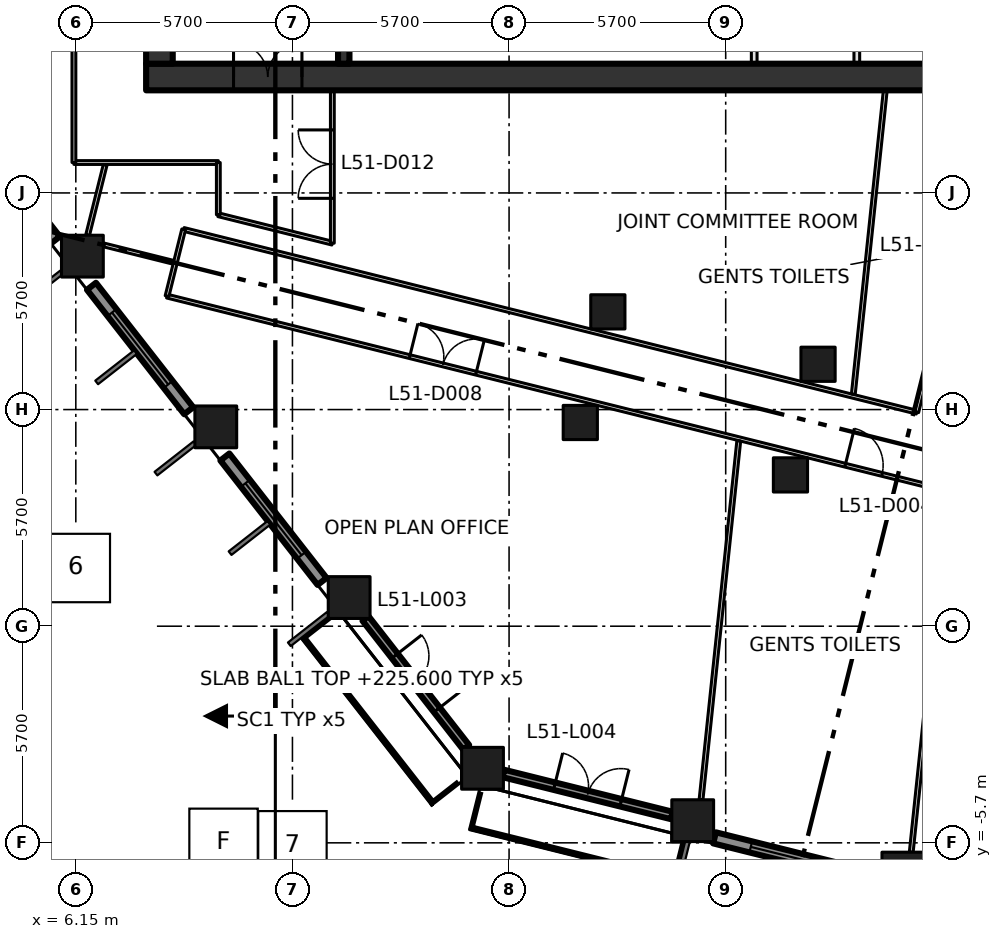
"""IFC4 building model, lengths in metres.
Left out: names, types, materials, properties, quantities, classifications, styles, units other than length and angle.
Written with IfcOpenShell. Run it as: python <this file> out.ifc"""

import sys

from ifc_helpers import new_model, si_unit, direction, frame, frame_2d, origin, origin_2d, place, context, subcontext, project, spatial, rectangle, extrude, element, fill, save


model = new_model("IFC4")
c1 = context("Model", 3, precision=1e-05, world=origin(), true_north=direction((0.0, 1.0)))
c2 = subcontext(c1, "Body", "Model", "MODEL_VIEW")
j1 = project(units=[si_unit("LENGTHUNIT", "METRE"), si_unit("PLANEANGLEUNIT", "RADIAN")], contexts=[c1])
p1 = place(None, origin())
s1 = spatial("IfcSite", under=j1, at=p1, CompositionType="ELEMENT")
p2 = place(p1, origin())
s2 = spatial("IfcBuilding", under=s1, at=p2, CompositionType="ELEMENT")
p3 = place(p2, frame((0.0, 0.0, 225.6)))
s3 = spatial("IfcBuildingStorey", under=s2, at=p3, CompositionType="ELEMENT", Elevation=225.6)
for number, where, z_axis, x_axis in (
    (1, (16.851, -3.738, 0.0), (0.0, 0.0, 1.0), (1.0, 0.0, 0.0)),
    (2, (13.342, 0.754, 0.0), (0.0, 0.0, 1.0), (1.0, 0.0, 0.0)),
    (3, (9.833, 5.245, 0.0), (0.0, 0.0, 1.0), (1.0, 0.0, 0.0)),
    (4, (6.323, 9.737, 0.0), (0.0, 0.0, 1.0), (1.0, 0.0, 0.0)),
    (5, (22.382, -5.117, 0.0), (0.0, 0.0, 1.0), (1.0, 0.0, 0.0)),
    (6, (27.912, -6.496, 0.0), (0.0, 0.0, 1.0), (1.0, 0.0, 0.0)),
):
    element("IfcColumn", number, at=place(p3, frame(where, z_axis=z_axis, x_axis=x_axis)), inside=s3, PredefinedType="COLUMN", context=c2, shape_type="SweptSolid", body=[
        extrude(rectangle(XDim=1.1, YDim=1.1, at=origin_2d()), origin(), (0.0, 0.0, 1.0), 4.2),
    ])
for number, where, z_axis, x_axis in (
    (7, (19.424, 5.36, 0.0), (0.0, 0.0, 1.0), (1.0, 0.0, 0.0)),
    (8, (24.954, 3.981, 0.0), (0.0, 0.0, 1.0), (1.0, 0.0, 0.0)),
    (9, (20.149, 8.271, 0.0), (0.0, 0.0, 1.0), (1.0, 0.0, 0.0)),
    (10, (25.68, 6.892, 0.0), (0.0, 0.0, 1.0), (1.0, 0.0, 0.0)),
):
    element("IfcColumn", number, at=place(p3, frame(where, z_axis=z_axis, x_axis=x_axis)), inside=s3, PredefinedType="COLUMN", context=c2, shape_type="SweptSolid", body=[
        extrude(rectangle(XDim=0.9, YDim=0.9, at=origin_2d()), origin(), (0.0, 0.0, 1.0), 4.2),
    ])
p4 = place(p3, frame((8.0, 14.45, -0.3), z_axis=(0.0, 0.0, 1.0), x_axis=(1.0, 0.0, 0.0)))
e11 = element("IfcWall", 11, at=p4, inside=s3, PredefinedType="SHEAR", context=c2, shape_type="SweptSolid", body=[
    extrude(rectangle(XDim=22.8, YDim=0.7, at=frame_2d((11.4, 0.0))), origin(), (0.0, 0.0, 1.0), 4.2),
])
p5 = place(p4, frame((2.3, 0.0, 0.3)))
e12 = element("IfcOpeningElement", 12, at=p5, cuts=e11, PredefinedType="OPENING", context=c2, shape_type="SweptSolid", body=[
    extrude(rectangle(XDim=1.8, YDim=2.1, at=frame_2d((0.9, 1.05))), frame((0.0, 0.36, 0.0), z_axis=(0.0, -1.0, 0.0), x_axis=(1.0, 0.0, 0.0)), (0.0, 0.0, 1.0), 0.72),
])
p6 = place(p3, frame((8.35, 14.8, -0.3), z_axis=(0.0, 0.0, 1.0), x_axis=(0.0, 1.0, 0.0)))
e13 = element("IfcWall", 13, at=p6, inside=s3, PredefinedType="SHEAR", context=c2, shape_type="SweptSolid", body=[
    extrude(rectangle(XDim=20.9, YDim=0.7, at=frame_2d((10.45, 0.0))), origin(), (0.0, 0.0, 1.0), 4.2),
])
p7 = place(p3, frame((13.2, 14.8, 0.0), z_axis=(0.0, 0.0, 1.0), x_axis=(0.0, 1.0, 0.0)))
e14 = element("IfcWall", 14, at=p7, inside=s3, PredefinedType="SHEAR", context=c2, shape_type="SweptSolid", body=[
    extrude(rectangle(XDim=20.9, YDim=0.3, at=frame_2d((10.45, 0.0))), origin(), (0.0, 0.0, 1.0), 3.9),
])
p8 = place(p7, frame((3.5, 0.0, 0.0)))
e15 = element("IfcOpeningElement", 15, at=p8, cuts=e14, PredefinedType="OPENING", context=c2, shape_type="SweptSolid", body=[
    extrude(rectangle(XDim=1.8, YDim=2.1, at=frame_2d((0.9, 1.05))), frame((0.0, 0.16, 0.0), z_axis=(0.0, -1.0, 0.0), x_axis=(1.0, 0.0, 0.0)), (0.0, 0.0, 1.0), 0.32),
])
p9 = place(p7, frame((11.6, 0.0, 0.0)))
e16 = element("IfcOpeningElement", 16, at=p9, cuts=e14, PredefinedType="OPENING", context=c2, shape_type="SweptSolid", body=[
    extrude(rectangle(XDim=1.2, YDim=2.1, at=frame_2d((0.6, 1.05))), frame((0.0, 0.16, 0.0), z_axis=(0.0, -1.0, 0.0), x_axis=(1.0, 0.0, 0.0)), (0.0, 0.0, 1.0), 0.32),
])
for number, where, z_axis, x_axis in (
    (17, (24.0, 14.8, 0.0), (0.0, 0.0, 1.0), (0.0, 1.0, 0.0)),
    (18, (26.7, 14.8, 0.0), (0.0, 0.0, 1.0), (0.0, 1.0, 0.0)),
):
    element("IfcWall", number, at=place(p3, frame(where, z_axis=z_axis, x_axis=x_axis)), inside=s3, PredefinedType="PARTITIONING", context=c2, shape_type="SweptSolid", body=[
        extrude(rectangle(XDim=2.825, YDim=0.15, at=frame_2d((1.413, 0.0))), origin(), (0.0, 0.0, 1.0), 3.9),
    ])
p10 = place(p3, frame((3.053, 13.436, 0.0), z_axis=(0.0, 0.0, 1.0), x_axis=(0.615699893917, -0.787980736205, 0.0)))
e19 = element("IfcWall", 19, at=p10, inside=s3, PredefinedType="SOLIDWALL", context=c2, shape_type="SweptSolid", body=[
    extrude(rectangle(XDim=4.156, YDim=0.3, at=frame_2d((2.078, 0.0))), origin(), (0.0, 0.0, 1.0), 3.15),
])
p11 = place(p10, frame((0.878, 0.0, 0.8)))
e20 = element("IfcOpeningElement", 20, at=p11, cuts=e19, PredefinedType="OPENING", context=c2, shape_type="SweptSolid", body=[
    extrude(rectangle(XDim=2.4, YDim=2.1, at=frame_2d((1.2, 1.05))), frame((0.0, 0.16, 0.0), z_axis=(0.0, -1.0, 0.0), x_axis=(1.0, 0.0, 0.0)), (0.0, 0.0, 1.0), 0.32),
])
p12 = place(p3, frame((6.562, 8.944, 0.0), z_axis=(0.0, 0.0, 1.0), x_axis=(0.615699893917, -0.787980736205, 0.0)))
e21 = element("IfcWall", 21, at=p12, inside=s3, PredefinedType="SOLIDWALL", context=c2, shape_type="SweptSolid", body=[
    extrude(rectangle(XDim=4.156, YDim=0.3, at=frame_2d((2.078, 0.0))), origin(), (0.0, 0.0, 1.0), 3.15),
])
p13 = place(p12, frame((0.878, 0.0, 0.8)))
e22 = element("IfcOpeningElement", 22, at=p13, cuts=e21, PredefinedType="OPENING", context=c2, shape_type="SweptSolid", body=[
    extrude(rectangle(XDim=2.4, YDim=2.1, at=frame_2d((1.2, 1.05))), frame((0.0, 0.16, 0.0), z_axis=(0.0, -1.0, 0.0), x_axis=(1.0, 0.0, 0.0)), (0.0, 0.0, 1.0), 0.32),
])
p14 = place(p3, frame((10.072, 4.452, 0.0), z_axis=(0.0, 0.0, 1.0), x_axis=(0.615660006568, -0.788011901124, 0.0)))
e23 = element("IfcWall", 23, at=p14, inside=s3, PredefinedType="SOLIDWALL", context=c2, shape_type="SweptSolid", body=[
    extrude(rectangle(XDim=4.155, YDim=0.3, at=frame_2d((2.077, 0.0))), origin(), (0.0, 0.0, 1.0), 3.15),
])
p15 = place(p14, frame((0.878, 0.0, 0.8)))
e24 = element("IfcOpeningElement", 24, at=p15, cuts=e23, PredefinedType="OPENING", context=c2, shape_type="SweptSolid", body=[
    extrude(rectangle(XDim=2.4, YDim=2.1, at=frame_2d((1.2, 1.05))), frame((0.0, 0.16, 0.0), z_axis=(0.0, -1.0, 0.0), x_axis=(1.0, 0.0, 0.0)), (0.0, 0.0, 1.0), 0.32),
])
p16 = place(p3, frame((13.772, 0.204, 0.0), z_axis=(0.0, 0.0, 1.0), x_axis=(0.615478906808, -0.788153357713, 0.0)))
e25 = element("IfcWall", 25, at=p16, inside=s3, PredefinedType="SOLIDWALL", context=c2, shape_type="SweptSolid", body=[
    extrude(rectangle(XDim=4.304, YDim=0.2, at=frame_2d((2.152, 0.0))), origin(), (0.0, 0.0, 1.0), 3.15),
])
p17 = place(p16, frame((1.252, 0.0, 0.0)))
e26 = element("IfcOpeningElement", 26, at=p17, cuts=e25, PredefinedType="OPENING", context=c2, shape_type="SweptSolid", body=[
    extrude(rectangle(XDim=1.8, YDim=2.9, at=frame_2d((0.9, 1.45))), frame((0.0, 0.11, 0.0), z_axis=(0.0, -1.0, 0.0), x_axis=(1.0, 0.0, 0.0)), (0.0, 0.0, 1.0), 0.22),
])
p18 = place(p3, frame((12.398, -0.199, 0.0), z_axis=(0.0, 0.0, 1.0), x_axis=(0.615638738903, -0.788028516719, 0.0)))
e27 = element("IfcWall", 27, at=p18, inside=s3, PredefinedType="SOLIDWALL", context=c2, shape_type="SweptSolid", body=[
    extrude(rectangle(XDim=5.36, YDim=0.4, at=frame_2d((2.68, 0.0))), origin(), (0.0, 0.0, 1.0), 0.3),
])
p19 = place(p3, frame((17.401, -3.875, 0.0), z_axis=(0.0, 0.0, 1.0), x_axis=(0.970286982272, -0.241956963183, 0.0)))
e28 = element("IfcWall", 28, at=p19, inside=s3, PredefinedType="SOLIDWALL", context=c2, shape_type="SweptSolid", body=[
    extrude(rectangle(XDim=4.567, YDim=0.2, at=frame_2d((2.283, 0.0))), origin(), (0.0, 0.0, 1.0), 3.15),
])
p20 = place(p19, frame((1.383, 0.0, 0.0)))
e29 = element("IfcOpeningElement", 29, at=p20, cuts=e28, PredefinedType="OPENING", context=c2, shape_type="SweptSolid", body=[
    extrude(rectangle(XDim=1.8, YDim=2.9, at=frame_2d((0.9, 1.45))), frame((0.0, 0.11, 0.0), z_axis=(0.0, -1.0, 0.0), x_axis=(1.0, 0.0, 0.0)), (0.0, 0.0, 1.0), 0.22),
])
p21 = place(p3, frame((16.694, -5.069, 0.0), z_axis=(0.0, 0.0, 1.0), x_axis=(0.970289679319, -0.241946147329, 0.0)))
e30 = element("IfcWall", 30, at=p21, inside=s3, PredefinedType="SOLIDWALL", context=c2, shape_type="SweptSolid", body=[
    extrude(rectangle(XDim=5.36, YDim=0.4, at=frame_2d((2.68, 0.0))), origin(), (0.0, 0.0, 1.0), 0.3),
])
p22 = place(p3, frame((22.956, -5.569, 0.0), z_axis=(0.0, 0.0, 1.0), x_axis=(0.970323116569, -0.241812012628, 0.0)))
e31 = element("IfcWall", 31, at=p22, inside=s3, PredefinedType="SOLIDWALL", context=c2, shape_type="SweptSolid", body=[
    extrude(rectangle(XDim=4.367, YDim=0.3, at=frame_2d((2.183, 0.0))), origin(), (0.0, 0.0, 1.0), 3.15),
])
p23 = place(p22, frame((0.983, 0.0, 0.8)))
e32 = element("IfcOpeningElement", 32, at=p23, cuts=e31, PredefinedType="OPENING", context=c2, shape_type="SweptSolid", body=[
    extrude(rectangle(XDim=2.4, YDim=2.1, at=frame_2d((1.2, 1.05))), frame((0.0, 0.16, 0.0), z_axis=(0.0, -1.0, 0.0), x_axis=(1.0, 0.0, 0.0)), (0.0, 0.0, 1.0), 0.32),
])
p24 = place(p3, frame((6.1, 12.2, 0.0), z_axis=(0.0, 0.0, 1.0), x_axis=(1.0, 0.0, 0.0)))
e33 = element("IfcWall", 33, at=p24, inside=s3, PredefinedType="PARTITIONING", context=c2, shape_type="SweptSolid", body=[
    extrude(rectangle(XDim=3.8, YDim=0.1, at=frame_2d((1.9, 0.0))), origin(), (0.0, 0.0, 1.0), 3.9),
])
p25 = place(p3, frame((6.1, 38.9, 0.0), z_axis=(0.0, 0.0, 1.0), x_axis=(0.0, -1.0, 0.0)))
e34 = element("IfcWall", 34, at=p25, inside=s3, PredefinedType="PARTITIONING", context=c2, shape_type="SweptSolid", body=[
    extrude(rectangle(XDim=26.7, YDim=0.1, at=frame_2d((13.35, 0.0))), origin(), (0.0, 0.0, 1.0), 3.9),
])
p26 = place(p25, frame((17.936, 0.0, 0.0)))
e35 = element("IfcOpeningElement", 35, at=p26, cuts=e34, PredefinedType="OPENING", context=c2, shape_type="SweptSolid", body=[
    extrude(rectangle(XDim=1.0, YDim=2.1, at=frame_2d((0.5, 1.05))), frame((0.0, 0.06, 0.0), z_axis=(0.0, -1.0, 0.0), x_axis=(1.0, 0.0, 0.0)), (0.0, 0.0, 1.0), 0.12),
])
p27 = place(p3, frame((8.55, 8.685, 0.0), z_axis=(0.0, 0.0, 1.0), x_axis=(0.970297101369, -0.241916380335, 0.0)))
e36 = element("IfcWall", 36, at=p27, inside=s3, PredefinedType="PARTITIONING", context=c2, shape_type="SweptSolid", body=[
    extrude(rectangle(XDim=51.675, YDim=0.1, at=frame_2d((25.837, 0.0))), origin(), (0.0, 0.0, 1.0), 3.9),
])
p28 = place(p27, frame((18.391, 0.0, 0.0)))
e37 = element("IfcOpeningElement", 37, at=p28, cuts=e36, PredefinedType="OPENING", context=c2, shape_type="SweptSolid", body=[
    extrude(rectangle(XDim=1.0, YDim=2.1, at=frame_2d((0.5, 1.05))), frame((0.0, 0.06, 0.0), z_axis=(0.0, -1.0, 0.0), x_axis=(1.0, 0.0, 0.0)), (0.0, 0.0, 1.0), 0.12),
])
p29 = place(p27, frame((24.69, 0.0, 0.0)))
e38 = element("IfcOpeningElement", 38, at=p29, cuts=e36, PredefinedType="OPENING", context=c2, shape_type="SweptSolid", body=[
    extrude(rectangle(XDim=1.0, YDim=2.1, at=frame_2d((0.5, 1.05))), frame((0.0, 0.06, 0.0), z_axis=(0.0, -1.0, 0.0), x_axis=(1.0, 0.0, 0.0)), (0.0, 0.0, 1.0), 0.12),
])
p30 = place(p27, frame((29.99, 0.0, 0.0)))
e39 = element("IfcOpeningElement", 39, at=p30, cuts=e36, PredefinedType="OPENING", context=c2, shape_type="SweptSolid", body=[
    extrude(rectangle(XDim=1.8, YDim=2.1, at=frame_2d((0.9, 1.05))), frame((0.0, 0.06, 0.0), z_axis=(0.0, -1.0, 0.0), x_axis=(1.0, 0.0, 0.0)), (0.0, 0.0, 1.0), 0.12),
])
p31 = place(p27, frame((6.58, 0.0, 0.0)))
e40 = element("IfcOpeningElement", 40, at=p31, cuts=e36, PredefinedType="OPENING", context=c2, shape_type="SweptSolid", body=[
    extrude(rectangle(XDim=1.8, YDim=2.1, at=frame_2d((0.9, 1.05))), frame((0.0, 0.06, 0.0), z_axis=(0.0, -1.0, 0.0), x_axis=(1.0, 0.0, 0.0)), (0.0, 0.0, 1.0), 0.12),
])
p32 = place(p3, frame((8.988, 10.44, 0.0), z_axis=(0.0, 0.0, 1.0), x_axis=(0.970301223092, -0.241899848006, 0.0)))
e41 = element("IfcWall", 41, at=p32, inside=s3, PredefinedType="PARTITIONING", context=c2, shape_type="SweptSolid", body=[
    extrude(rectangle(XDim=19.879, YDim=0.1, at=frame_2d((9.94, 0.0))), origin(), (0.0, 0.0, 1.0), 3.9),
])
p33 = place(p3, frame((8.988, 10.44, 0.0), z_axis=(0.0, 0.0, 1.0), x_axis=(-0.242154485745, -0.970237705428, 0.0)))
e42 = element("IfcWall", 42, at=p33, inside=s3, PredefinedType="PARTITIONING", context=c2, shape_type="SweptSolid", body=[
    extrude(rectangle(XDim=1.809, YDim=0.1, at=frame_2d((0.904, 0.0))), origin(), (0.0, 0.0, 1.0), 3.9),
])
p34 = place(p3, frame((9.9, 10.826, 0.0), z_axis=(0.0, 0.0, 1.0), x_axis=(0.970290953223, -0.241941038466, 0.0)))
e43 = element("IfcWall", 43, at=p34, inside=s3, PredefinedType="PARTITIONING", context=c2, shape_type="SweptSolid", body=[
    extrude(rectangle(XDim=3.092, YDim=0.1, at=frame_2d((1.546, 0.0))), origin(), (0.0, 0.0, 1.0), 3.9),
])
p35 = place(p3, frame((9.9, 12.2, 0.0), z_axis=(0.0, 0.0, 1.0), x_axis=(0.0, -1.0, 0.0)))
e44 = element("IfcWall", 44, at=p35, inside=s3, PredefinedType="PARTITIONING", context=c2, shape_type="SweptSolid", body=[
    extrude(rectangle(XDim=1.374, YDim=0.1, at=frame_2d((0.687, 0.0))), origin(), (0.0, 0.0, 1.0), 3.9),
])
p36 = place(p3, frame((12.9, 10.078, 0.0), z_axis=(0.0, 0.0, 1.0), x_axis=(0.0, 1.0, 0.0)))
e45 = element("IfcWall", 45, at=p36, inside=s3, PredefinedType="PARTITIONING", context=c2, shape_type="SweptSolid", body=[
    extrude(rectangle(XDim=4.022, YDim=0.1, at=frame_2d((2.011, 0.0))), origin(), (0.0, 0.0, 1.0), 3.9),
])
p37 = place(p36, frame((1.18, 0.0, 0.0)))
e46 = element("IfcOpeningElement", 46, at=p37, cuts=e45, PredefinedType="OPENING", context=c2, shape_type="SweptSolid", body=[
    extrude(rectangle(XDim=1.8, YDim=2.1, at=frame_2d((0.9, 1.05))), frame((0.0, 0.06, 0.0), z_axis=(0.0, -1.0, 0.0), x_axis=(1.0, 0.0, 0.0)), (0.0, 0.0, 1.0), 0.12),
])
p38 = place(p3, frame((30.259, 13.583, 0.0), z_axis=(0.0, 0.0, 1.0), x_axis=(-0.241841612879, -0.970315739479, 0.0)))
e47 = element("IfcWall", 47, at=p38, inside=s3, PredefinedType="PARTITIONING", context=c2, shape_type="SweptSolid", body=[
    extrude(rectangle(XDim=8.195, YDim=0.1, at=frame_2d((4.098, 0.0))), origin(), (0.0, 0.0, 1.0), 3.9),
])
p39 = place(p38, frame((3.38, 0.0, 0.0)))
e48 = element("IfcOpeningElement", 48, at=p39, cuts=e47, PredefinedType="OPENING", context=c2, shape_type="SweptSolid", body=[
    extrude(rectangle(XDim=1.0, YDim=2.1, at=frame_2d((0.5, 1.05))), frame((0.0, 0.06, 0.0), z_axis=(0.0, -1.0, 0.0), x_axis=(1.0, 0.0, 0.0)), (0.0, 0.0, 1.0), 0.12),
])
p40 = place(p3, frame((6.922, 12.138, 0.0), z_axis=(0.0, 0.0, 1.0), x_axis=(-0.242264600824, -0.970210215978, 0.0)))
e49 = element("IfcWall", 49, at=p40, inside=s3, PredefinedType="PARTITIONING", context=c2, shape_type="SweptSolid", body=[
    extrude(rectangle(XDim=1.908, YDim=0.1, at=frame_2d((0.954, 0.0))), origin(), (0.0, 0.0, 1.0), 3.9),
])
p41 = place(p3, frame((8.72, 9.574, 0.0), z_axis=(0.0, 0.0, 1.0), x_axis=(-0.970240497311, 0.242143299263, 0.0)))
e50 = element("IfcWall", 50, at=p41, inside=s3, PredefinedType="PARTITIONING", context=c2, shape_type="SweptSolid", body=[
    extrude(rectangle(XDim=1.904, YDim=0.1, at=frame_2d((0.952, 0.0))), origin(), (0.0, 0.0, 1.0), 3.9),
])
p42 = place(p3, frame((22.601, -4.567, 0.0), z_axis=(0.0, 0.0, 1.0), x_axis=(0.104573690763, 0.994517140727, 0.0)))
e51 = element("IfcWall", 51, at=p42, inside=s3, PredefinedType="PARTITIONING", context=c2, shape_type="SweptSolid", body=[
    extrude(rectangle(XDim=9.495, YDim=0.1, at=frame_2d((4.748, 0.0))), origin(), (0.0, 0.0, 1.0), 3.9),
])
p43 = place(p3, frame((26.608, 6.105, 0.0), z_axis=(0.0, 0.0, 1.0), x_axis=(0.104619970127, 0.994512273353, 0.0)))
e52 = element("IfcWall", 52, at=p43, inside=s3, PredefinedType="PARTITIONING", context=c2, shape_type="SweptSolid", body=[
    extrude(rectangle(XDim=8.039, YDim=0.1, at=frame_2d((4.02, 0.0))), origin(), (0.0, 0.0, 1.0), 3.9),
])
p44 = place(p3, frame((28.132, -5.946, 0.0), z_axis=(0.0, 0.0, 1.0), x_axis=(0.104469291407, 0.994528112802, 0.0)))
e53 = element("IfcWall", 53, at=p44, inside=s3, PredefinedType="PARTITIONING", context=c2, shape_type="SweptSolid", body=[
    extrude(rectangle(XDim=9.495, YDim=0.1, at=frame_2d((4.748, 0.0))), origin(), (0.0, 0.0, 1.0), 3.9),
])
p45 = place(p5, origin())
e54 = element("IfcDoor", 54, at=p45, inside=s3, OperationType="DOUBLE_DOOR_SINGLE_SWING", PredefinedType="DOOR", context=c2, shape_type="SweptSolid", body=[
    extrude(rectangle(XDim=1.8, YDim=2.1, at=frame_2d((0.9, 1.05))), frame((0.0, 0.025, 0.0), z_axis=(0.0, -1.0, 0.0), x_axis=(1.0, 0.0, 0.0)), (0.0, 0.0, 1.0), 0.05),
])
fill(e12, e54)
p46 = place(p13, origin())
e55 = element("IfcWindow", 55, at=p46, inside=s3, PartitioningType="DOUBLE_PANEL_VERTICAL", PredefinedType="WINDOW", context=c2, shape_type="SweptSolid", body=[
    extrude(rectangle(XDim=2.4, YDim=2.1, at=frame_2d((1.2, 1.05))), frame((0.0, 0.03, 0.0), z_axis=(0.0, -1.0, 0.0), x_axis=(1.0, 0.0, 0.0)), (0.0, 0.0, 1.0), 0.06),
])
fill(e22, e55)
p47 = place(p15, origin())
e56 = element("IfcWindow", 56, at=p47, inside=s3, PartitioningType="DOUBLE_PANEL_VERTICAL", PredefinedType="WINDOW", context=c2, shape_type="SweptSolid", body=[
    extrude(rectangle(XDim=2.4, YDim=2.1, at=frame_2d((1.2, 1.05))), frame((0.0, 0.03, 0.0), z_axis=(0.0, -1.0, 0.0), x_axis=(1.0, 0.0, 0.0)), (0.0, 0.0, 1.0), 0.06),
])
fill(e24, e56)
p48 = place(p17, origin())
e57 = element("IfcDoor", 57, at=p48, inside=s3, OperationType="DOUBLE_DOOR_SINGLE_SWING", PredefinedType="DOOR", context=c2, shape_type="SweptSolid", body=[
    extrude(rectangle(XDim=1.8, YDim=2.9, at=frame_2d((0.9, 1.45))), frame((0.0, 0.025, 0.0), z_axis=(0.0, -1.0, 0.0), x_axis=(1.0, 0.0, 0.0)), (0.0, 0.0, 1.0), 0.05),
])
fill(e26, e57)
p49 = place(p20, origin())
e58 = element("IfcDoor", 58, at=p49, inside=s3, OperationType="DOUBLE_DOOR_SINGLE_SWING", PredefinedType="DOOR", context=c2, shape_type="SweptSolid", body=[
    extrude(rectangle(XDim=1.8, YDim=2.9, at=frame_2d((0.9, 1.45))), frame((0.0, 0.025, 0.0), z_axis=(0.0, -1.0, 0.0), x_axis=(1.0, 0.0, 0.0)), (0.0, 0.0, 1.0), 0.05),
])
fill(e29, e58)
p50 = place(p23, origin())
e59 = element("IfcWindow", 59, at=p50, inside=s3, PartitioningType="DOUBLE_PANEL_VERTICAL", PredefinedType="WINDOW", context=c2, shape_type="SweptSolid", body=[
    extrude(rectangle(XDim=2.4, YDim=2.1, at=frame_2d((1.2, 1.05))), frame((0.0, 0.03, 0.0), z_axis=(0.0, -1.0, 0.0), x_axis=(1.0, 0.0, 0.0)), (0.0, 0.0, 1.0), 0.06),
])
fill(e32, e59)
p51 = place(p28, origin())
e60 = element("IfcDoor", 60, at=p51, inside=s3, OperationType="SINGLE_SWING_LEFT", PredefinedType="DOOR", context=c2, shape_type="SweptSolid", body=[
    extrude(rectangle(XDim=1.0, YDim=2.1, at=frame_2d((0.5, 1.05))), frame((0.0, 0.025, 0.0), z_axis=(0.0, -1.0, 0.0), x_axis=(1.0, 0.0, 0.0)), (0.0, 0.0, 1.0), 0.05),
])
fill(e37, e60)
p52 = place(p31, origin())
e61 = element("IfcDoor", 61, at=p52, inside=s3, OperationType="DOUBLE_DOOR_SINGLE_SWING", PredefinedType="DOOR", context=c2, shape_type="SweptSolid", body=[
    extrude(rectangle(XDim=1.8, YDim=2.1, at=frame_2d((0.9, 1.05))), frame((0.0, 0.025, 0.0), z_axis=(0.0, -1.0, 0.0), x_axis=(1.0, 0.0, 0.0)), (0.0, 0.0, 1.0), 0.05),
])
fill(e40, e61)
p53 = place(p37, origin())
e62 = element("IfcDoor", 62, at=p53, inside=s3, OperationType="DOUBLE_DOOR_SINGLE_SWING", PredefinedType="DOOR", context=c2, shape_type="SweptSolid", body=[
    extrude(rectangle(XDim=1.8, YDim=2.1, at=frame_2d((0.9, 1.05))), frame((0.0, 0.025, 0.0), z_axis=(0.0, -1.0, 0.0), x_axis=(1.0, 0.0, 0.0)), (0.0, 0.0, 1.0), 0.05),
])
fill(e46, e62)
save(model, sys.argv[1])
